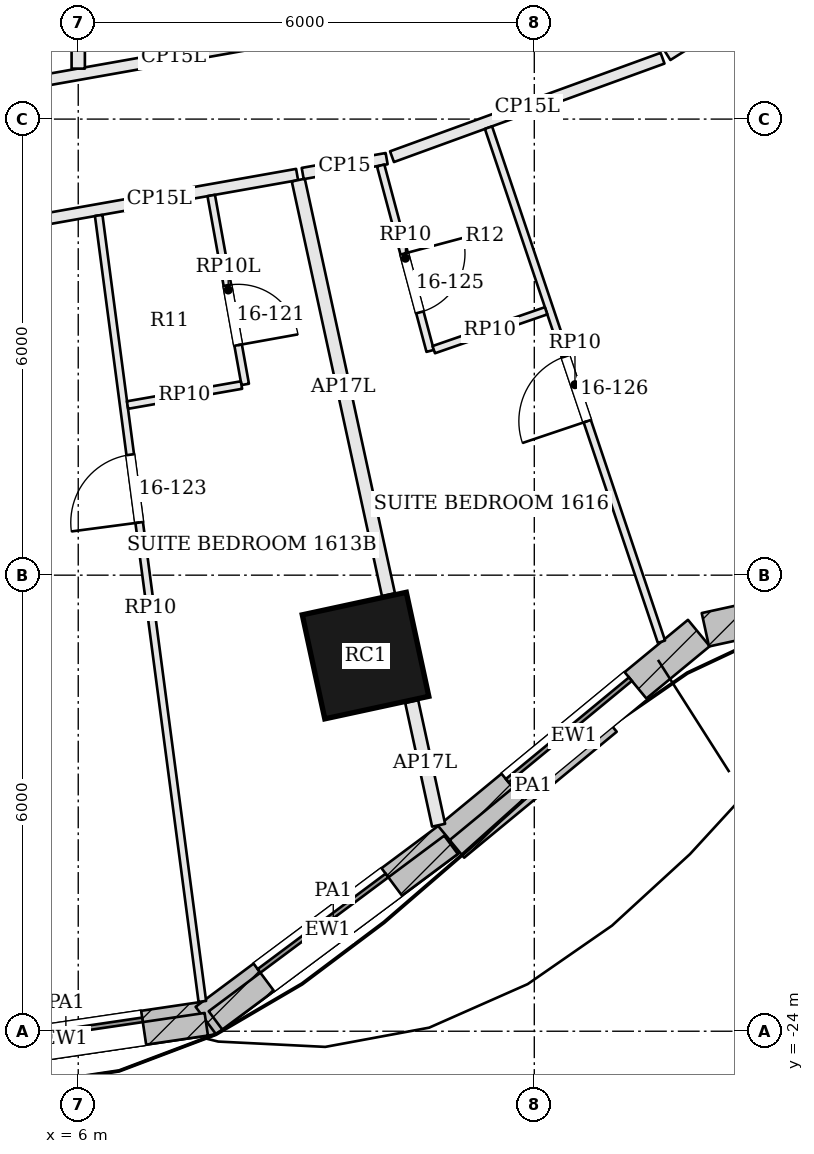
"""IFC4 building model, lengths in metres.
Left out: names, types, materials, properties, quantities, classifications, styles, units other than length and angle.
Written with IfcOpenShell. Run it as: python <this file> out.ifc"""

import sys

from ifc_helpers import new_model, si_unit, direction, frame, frame_2d, origin, origin_2d, place, context, subcontext, project, spatial, rectangle, extrude, element, fill, save


model = new_model("IFC4")
c1 = context("Model", 3, precision=1e-05, world=origin(), true_north=direction((0.0, 1.0)))
c2 = subcontext(c1, "Body", "Model", "MODEL_VIEW")
j1 = project(units=[si_unit("LENGTHUNIT", "METRE"), si_unit("PLANEANGLEUNIT", "RADIAN")], contexts=[c1])
p1 = place(None, origin())
s1 = spatial("IfcSite", under=j1, at=p1, CompositionType="ELEMENT")
p2 = place(p1, origin())
s2 = spatial("IfcBuilding", under=s1, at=p2, CompositionType="ELEMENT")
p3 = place(p2, frame((0.0, 0.0, 73.5)))
s3 = spatial("IfcBuildingStorey", under=s2, at=p3, CompositionType="ELEMENT", Elevation=73.5)
p4 = place(p3, frame((9.78, -19.058, 0.0), z_axis=(0.0, 0.0, 1.0), x_axis=(0.977386186482, 0.211462153764, 0.0)))
e1 = element("IfcColumn", 1, at=p4, inside=s3, PredefinedType="COLUMN", context=c2, shape_type="SweptSolid", body=[
    extrude(rectangle(XDim=1.4, YDim=1.4, at=origin_2d()), origin(), (0.0, 0.0, 1.0), 2.8),
])
p5 = place(p3, frame((3.866, -24.396, 0.0), z_axis=(0.0, 0.0, 1.0), x_axis=(0.989255112942, 0.146199594798, 0.0)))
e2 = element("IfcWall", 2, at=p5, inside=s3, PredefinedType="SOLIDWALL", context=c2, shape_type="SweptSolid", body=[
    extrude(rectangle(XDim=3.954, YDim=0.45, at=frame_2d((1.977, 0.0))), origin(), (0.0, 0.0, 1.0), 3.3),
])
p6 = place(p5, frame((0.927, 0.0, 0.9)))
e3 = element("IfcOpeningElement", 3, at=p6, cuts=e2, PredefinedType="OPENING", context=c2, shape_type="SweptSolid", body=[
    extrude(rectangle(XDim=2.1, YDim=1.8, at=frame_2d((1.05, 0.9))), frame((0.0, 0.235, 0.0), z_axis=(0.0, -1.0, 0.0), x_axis=(1.0, 0.0, 0.0)), (0.0, 0.0, 1.0), 0.47),
])
p7 = place(p3, frame((7.678, -23.859, 0.0), z_axis=(0.0, 0.0, 1.0), x_axis=(0.801665619573, 0.597772728046, 0.0)))
e4 = element("IfcWall", 4, at=p7, inside=s3, PredefinedType="SOLIDWALL", context=c2, shape_type="SweptSolid", body=[
    extrude(rectangle(XDim=4.003, YDim=0.45, at=frame_2d((2.001, 0.0))), origin(), (0.0, 0.0, 1.0), 3.3),
])
p8 = place(p7, frame((0.951, 0.0, 0.9)))
e5 = element("IfcOpeningElement", 5, at=p8, cuts=e4, PredefinedType="OPENING", context=c2, shape_type="SweptSolid", body=[
    extrude(rectangle(XDim=2.1, YDim=1.8, at=frame_2d((1.05, 0.9))), frame((0.0, 0.235, 0.0), z_axis=(0.0, -1.0, 0.0), x_axis=(1.0, 0.0, 0.0)), (0.0, 0.0, 1.0), 0.47),
])
p9 = place(p3, frame((10.879, -21.473, 0.0), z_axis=(0.0, 0.0, 1.0), x_axis=(0.77124668946, 0.636536365023, 0.0)))
e6 = element("IfcWall", 6, at=p9, inside=s3, PredefinedType="SOLIDWALL", context=c2, shape_type="SweptSolid", body=[
    extrude(rectangle(XDim=4.261, YDim=0.45, at=frame_2d((2.13, 0.0))), origin(), (0.0, 0.0, 1.0), 3.3),
])
p10 = place(p9, frame((1.08, 0.0, 0.9)))
e7 = element("IfcOpeningElement", 7, at=p10, cuts=e6, PredefinedType="OPENING", context=c2, shape_type="SweptSolid", body=[
    extrude(rectangle(XDim=2.1, YDim=1.8, at=frame_2d((1.05, 0.9))), frame((0.0, 0.235, 0.0), z_axis=(0.0, -1.0, 0.0), x_axis=(1.0, 0.0, 0.0)), (0.0, 0.0, 1.0), 0.47),
])
p11 = place(p3, frame((14.251, -18.718, 0.0), z_axis=(0.0, 0.0, 1.0), x_axis=(0.976903627618, 0.213680374267, 0.0)))
e8 = element("IfcWall", 8, at=p11, inside=s3, PredefinedType="SOLIDWALL", context=c2, shape_type="SweptSolid", body=[
    extrude(rectangle(XDim=3.97, YDim=0.45, at=frame_2d((1.985, 0.0))), origin(), (0.0, 0.0, 1.0), 3.3),
])
p12 = place(p11, frame((0.935, 0.0, 0.9)))
e9 = element("IfcOpeningElement", 9, at=p12, cuts=e8, PredefinedType="OPENING", context=c2, shape_type="SweptSolid", body=[
    extrude(rectangle(XDim=2.1, YDim=1.8, at=frame_2d((1.05, 0.9))), frame((0.0, 0.235, 0.0), z_axis=(0.0, -1.0, 0.0), x_axis=(1.0, 0.0, 0.0)), (0.0, 0.0, 1.0), 0.47),
])
p13 = place(p3, frame((3.99, -24.454, 3.6), z_axis=(0.0, 0.0, 1.0), x_axis=(0.989258150551, 0.146179039429, 0.0)))
e10 = element("IfcWall", 10, at=p13, inside=s3, PredefinedType="PARAPET", context=c2, shape_type="SweptSolid", body=[
    extrude(rectangle(XDim=3.734, YDim=0.3, at=frame_2d((1.867, 0.0))), origin(), (0.0, 0.0, 1.0), 1.1),
])
p14 = place(p3, frame((7.806, -23.858, 3.6), z_axis=(0.0, 0.0, 1.0), x_axis=(0.801649538596, 0.597794293439, 0.0)))
e11 = element("IfcWall", 11, at=p14, inside=s3, PredefinedType="PARAPET", context=c2, shape_type="SweptSolid", body=[
    extrude(rectangle(XDim=3.865, YDim=0.3, at=frame_2d((1.932, 0.0))), origin(), (0.0, 0.0, 1.0), 1.1),
])
p15 = place(p3, frame((10.982, -21.601, 3.6), z_axis=(0.0, 0.0, 1.0), x_axis=(0.771288080572, 0.63648621098, 0.0)))
e12 = element("IfcWall", 12, at=p15, inside=s3, PredefinedType="PARAPET", context=c2, shape_type="SweptSolid", body=[
    extrude(rectangle(XDim=2.603, YDim=0.3, at=frame_2d((1.301, 0.0))), origin(), (0.0, 0.0, 1.0), 1.1),
])
p16 = place(p3, frame((5.255, -13.371, 0.0), z_axis=(0.0, 0.0, 1.0), x_axis=(0.984677871603, 0.174383167696, 0.0)))
e13 = element("IfcWall", 13, at=p16, inside=s3, PredefinedType="PARTITIONING", context=c2, shape_type="SweptSolid", body=[
    extrude(rectangle(XDim=3.681, YDim=0.15, at=frame_2d((1.84, 0.0))), origin(), (0.0, 0.0, 1.0), 2.58),
])
p17 = place(p3, frame((10.741, -21.29, 0.0), z_axis=(0.0, 0.0, 1.0), x_axis=(-0.212673207196, 0.977123383683, 0.0)))
e14 = element("IfcWall", 14, at=p17, inside=s3, PredefinedType="PARTITIONING", context=c2, shape_type="SweptSolid", body=[
    extrude(rectangle(XDim=1.665, YDim=0.175, at=frame_2d((0.832, 0.0))), origin(), (0.0, 0.0, 1.0), 2.28),
])
p18 = place(p3, frame((10.081, -18.256, 0.0), z_axis=(0.0, 0.0, 1.0), x_axis=(-0.212542235069, 0.977151880882, 0.0)))
e15 = element("IfcWall", 15, at=p18, inside=s3, PredefinedType="PARTITIONING", context=c2, shape_type="SweptSolid", body=[
    extrude(rectangle(XDim=5.581, YDim=0.175, at=frame_2d((2.791, 0.0))), origin(), (0.0, 0.0, 1.0), 2.28),
])
p19 = place(p3, frame((8.953, -12.716, 0.0), z_axis=(0.0, 0.0, 1.0), x_axis=(0.984678178819, 0.17438143295, 0.0)))
e16 = element("IfcWall", 16, at=p19, inside=s3, PredefinedType="PARTITIONING", context=c2, shape_type="SweptSolid", body=[
    extrude(rectangle(XDim=1.121, YDim=0.15, at=frame_2d((0.561, 0.0))), origin(), (0.0, 0.0, 1.0), 2.684),
])
p20 = place(p3, frame((10.128, -12.494, 0.0), z_axis=(0.0, 0.0, 1.0), x_axis=(0.939720005412, 0.341944895309, 0.0)))
e17 = element("IfcWall", 17, at=p20, inside=s3, PredefinedType="PARTITIONING", context=c2, shape_type="SweptSolid", body=[
    extrude(rectangle(XDim=3.788, YDim=0.15, at=frame_2d((1.894, 0.0))), origin(), (0.0, 0.0, 1.0), 2.58),
])
p21 = place(p3, frame((13.751, -11.159, 0.0), z_axis=(0.0, 0.0, 1.0), x_axis=(0.846413381026, 0.532526420396, 0.0)))
e18 = element("IfcWall", 18, at=p21, inside=s3, PredefinedType="PARTITIONING", context=c2, shape_type="SweptSolid", body=[
    extrude(rectangle(XDim=3.522, YDim=0.15, at=frame_2d((1.761, 0.0))), origin(), (0.0, 0.0, 1.0), 2.684),
])
p22 = place(p21, frame((1.245, 0.0, 0.0)))
e19 = element("IfcOpeningElement", 19, at=p22, cuts=e18, PredefinedType="OPENING", context=c2, shape_type="SweptSolid", body=[
    extrude(rectangle(XDim=1.0, YDim=2.1, at=frame_2d((0.5, 1.05))), frame((0.0, 0.085, 0.0), z_axis=(0.0, -1.0, 0.0), x_axis=(1.0, 0.0, 0.0)), (0.0, 0.0, 1.0), 0.17),
])
p23 = place(p3, frame((9.515, -10.788, 0.0), z_axis=(0.0, 0.0, 1.0), x_axis=(-0.984662912103, -0.174467617423, 0.0)))
e20 = element("IfcWall", 20, at=p23, inside=s3, PredefinedType="PARTITIONING", context=c2, shape_type="SweptSolid", body=[
    extrude(rectangle(XDim=4.593, YDim=0.15, at=frame_2d((2.296, 0.0))), origin(), (0.0, 0.0, 1.0), 2.58),
])
p24 = place(p3, frame((7.633, -23.608, 0.0), z_axis=(0.0, 0.0, 1.0), x_axis=(-0.13070700248, 0.991421040478, 0.0)))
e21 = element("IfcWall", 21, at=p24, inside=s3, PredefinedType="PARTITIONING", context=c2, shape_type="SweptSolid", body=[
    extrude(rectangle(XDim=10.43, YDim=0.1, at=frame_2d((5.215, 0.0))), origin(), (0.0, 0.0, 1.0), 2.784),
])
p25 = place(p24, frame((6.355, 0.0, 0.0)))
e22 = element("IfcOpeningElement", 22, at=p25, cuts=e21, PredefinedType="OPENING", context=c2, shape_type="SweptSolid", body=[
    extrude(rectangle(XDim=0.9, YDim=2.4, at=frame_2d((0.45, 1.2))), frame((0.0, 0.06, 0.0), z_axis=(0.0, -1.0, 0.0), x_axis=(1.0, 0.0, 0.0)), (0.0, 0.0, 1.0), 0.12),
])
p26 = place(p3, frame((7.75, -13.005, 0.0), z_axis=(0.0, 0.0, 1.0), x_axis=(0.176945076227, -0.984220727276, 0.0)))
e23 = element("IfcWall", 23, at=p26, inside=s3, PredefinedType="PARTITIONING", context=c2, shape_type="SweptSolid", body=[
    extrude(rectangle(XDim=2.525, YDim=0.1, at=frame_2d((1.262, 0.0))), origin(), (0.0, 0.0, 1.0), 2.58),
])
p27 = place(p26, frame((1.2, 0.0, 0.0)))
e24 = element("IfcOpeningElement", 24, at=p27, cuts=e23, PredefinedType="OPENING", context=c2, shape_type="SweptSolid", body=[
    extrude(rectangle(XDim=0.8, YDim=2.1, at=frame_2d((0.4, 1.05))), frame((0.0, 0.06, 0.0), z_axis=(0.0, -1.0, 0.0), x_axis=(1.0, 0.0, 0.0)), (0.0, 0.0, 1.0), 0.12),
])
p28 = place(p3, frame((8.147, -15.499, 0.0), z_axis=(0.0, 0.0, 1.0), x_axis=(-0.984907650176, -0.173080676635, 0.0)))
e25 = element("IfcWall", 25, at=p28, inside=s3, PredefinedType="PARTITIONING", context=c2, shape_type="SweptSolid", body=[
    extrude(rectangle(XDim=1.522, YDim=0.1, at=frame_2d((0.761, 0.0))), origin(), (0.0, 0.0, 1.0), 2.784),
])
p29 = place(p3, frame((13.673, -18.876, 0.0), z_axis=(0.0, 0.0, 1.0), x_axis=(-0.318864359282, 0.947800358926, 0.0)))
e26 = element("IfcWall", 26, at=p29, inside=s3, PredefinedType="PARTITIONING", context=c2, shape_type="SweptSolid", body=[
    extrude(rectangle(XDim=7.136, YDim=0.1, at=frame_2d((3.568, 0.0))), origin(), (0.0, 0.0, 1.0), 2.784),
])
p30 = place(p29, frame((3.061, 0.0, 0.0)))
e27 = element("IfcOpeningElement", 27, at=p30, cuts=e26, PredefinedType="OPENING", context=c2, shape_type="SweptSolid", body=[
    extrude(rectangle(XDim=0.9, YDim=2.4, at=frame_2d((0.45, 1.2))), frame((0.0, 0.06, 0.0), z_axis=(0.0, -1.0, 0.0), x_axis=(1.0, 0.0, 0.0)), (0.0, 0.0, 1.0), 0.12),
])
p31 = place(p3, frame((9.979, -12.61, 0.0), z_axis=(0.0, 0.0, 1.0), x_axis=(0.257885322866, -0.966175532836, 0.0)))
e28 = element("IfcWall", 28, at=p31, inside=s3, PredefinedType="PARTITIONING", context=c2, shape_type="SweptSolid", body=[
    extrude(rectangle(XDim=2.525, YDim=0.1, at=frame_2d((1.262, 0.0))), origin(), (0.0, 0.0, 1.0), 2.784),
])
p32 = place(p31, frame((1.2, 0.0, 0.0)))
e29 = element("IfcOpeningElement", 29, at=p32, cuts=e28, PredefinedType="OPENING", context=c2, shape_type="SweptSolid", body=[
    extrude(rectangle(XDim=0.8, YDim=2.1, at=frame_2d((0.4, 1.05))), frame((0.0, 0.06, 0.0), z_axis=(0.0, -1.0, 0.0), x_axis=(1.0, 0.0, 0.0)), (0.0, 0.0, 1.0), 0.12),
])
p33 = place(p3, frame((10.677, -15.033, 0.0), z_axis=(0.0, 0.0, 1.0), x_axis=(0.945015763174, 0.327024780946, 0.0)))
e30 = element("IfcWall", 30, at=p33, inside=s3, PredefinedType="PARTITIONING", context=c2, shape_type="SweptSolid", body=[
    extrude(rectangle(XDim=1.564, YDim=0.1, at=frame_2d((0.782, 0.0))), origin(), (0.0, 0.0, 1.0), 2.784),
])
p34 = place(p3, frame((6.0, -11.336, 0.0), z_axis=(0.0, 0.0, 1.0), x_axis=(0.0, 1.0, 0.0)))
e31 = element("IfcWall", 31, at=p34, inside=s3, PredefinedType="PARTITIONING", context=c2, shape_type="SweptSolid", body=[
    extrude(rectangle(XDim=6.461, YDim=0.175, at=frame_2d((3.23, 0.0))), origin(), (0.0, 0.0, 1.0), 2.28),
])
p35 = place(p6, origin())
e32 = element("IfcWindow", 32, at=p35, inside=s3, PartitioningType="SINGLE_PANEL", PredefinedType="WINDOW", context=c2, shape_type="SweptSolid", body=[
    extrude(rectangle(XDim=2.1, YDim=1.8, at=frame_2d((1.05, 0.9))), frame((0.0, 0.135, 0.0), z_axis=(0.0, -1.0, 0.0), x_axis=(1.0, 0.0, 0.0)), (0.0, 0.0, 1.0), 0.06),
])
fill(e3, e32)
p36 = place(p8, origin())
e33 = element("IfcWindow", 33, at=p36, inside=s3, PartitioningType="SINGLE_PANEL", PredefinedType="WINDOW", context=c2, shape_type="SweptSolid", body=[
    extrude(rectangle(XDim=2.1, YDim=1.8, at=frame_2d((1.05, 0.9))), frame((0.0, 0.135, 0.0), z_axis=(0.0, -1.0, 0.0), x_axis=(1.0, 0.0, 0.0)), (0.0, 0.0, 1.0), 0.06),
])
fill(e5, e33)
p37 = place(p10, origin())
e34 = element("IfcWindow", 34, at=p37, inside=s3, PartitioningType="SINGLE_PANEL", PredefinedType="WINDOW", context=c2, shape_type="SweptSolid", body=[
    extrude(rectangle(XDim=2.1, YDim=1.8, at=frame_2d((1.05, 0.9))), frame((0.0, 0.135, 0.0), z_axis=(0.0, -1.0, 0.0), x_axis=(1.0, 0.0, 0.0)), (0.0, 0.0, 1.0), 0.06),
])
fill(e7, e34)
p38 = place(p27, origin())
e35 = element("IfcDoor", 35, at=p38, inside=s3, OperationType="SINGLE_SWING_RIGHT", PredefinedType="DOOR", context=c2, shape_type="SweptSolid", body=[
    extrude(rectangle(XDim=0.8, YDim=2.1, at=frame_2d((0.4, 1.05))), frame((0.0, 0.025, 0.0), z_axis=(0.0, -1.0, 0.0), x_axis=(1.0, 0.0, 0.0)), (0.0, 0.0, 1.0), 0.05),
])
fill(e24, e35)
p39 = place(p25, origin())
e36 = element("IfcDoor", 36, at=p39, inside=s3, OperationType="SINGLE_SWING_LEFT", PredefinedType="DOOR", context=c2, shape_type="SweptSolid", body=[
    extrude(rectangle(XDim=0.9, YDim=2.4, at=frame_2d((0.45, 1.2))), frame((0.0, 0.025, 0.0), z_axis=(0.0, -1.0, 0.0), x_axis=(1.0, 0.0, 0.0)), (0.0, 0.0, 1.0), 0.05),
])
fill(e22, e36)
p40 = place(p32, origin())
e37 = element("IfcDoor", 37, at=p40, inside=s3, OperationType="SINGLE_SWING_LEFT", PredefinedType="DOOR", context=c2, shape_type="SweptSolid", body=[
    extrude(rectangle(XDim=0.8, YDim=2.1, at=frame_2d((0.4, 1.05))), frame((0.0, 0.025, 0.0), z_axis=(0.0, -1.0, 0.0), x_axis=(1.0, 0.0, 0.0)), (0.0, 0.0, 1.0), 0.05),
])
fill(e29, e37)
p41 = place(p30, origin())
e38 = element("IfcDoor", 38, at=p41, inside=s3, OperationType="SINGLE_SWING_LEFT", PredefinedType="DOOR", context=c2, shape_type="SweptSolid", body=[
    extrude(rectangle(XDim=0.9, YDim=2.4, at=frame_2d((0.45, 1.2))), frame((0.0, 0.025, 0.0), z_axis=(0.0, -1.0, 0.0), x_axis=(1.0, 0.0, 0.0)), (0.0, 0.0, 1.0), 0.05),
])
fill(e27, e38)
save(model, sys.argv[1])
